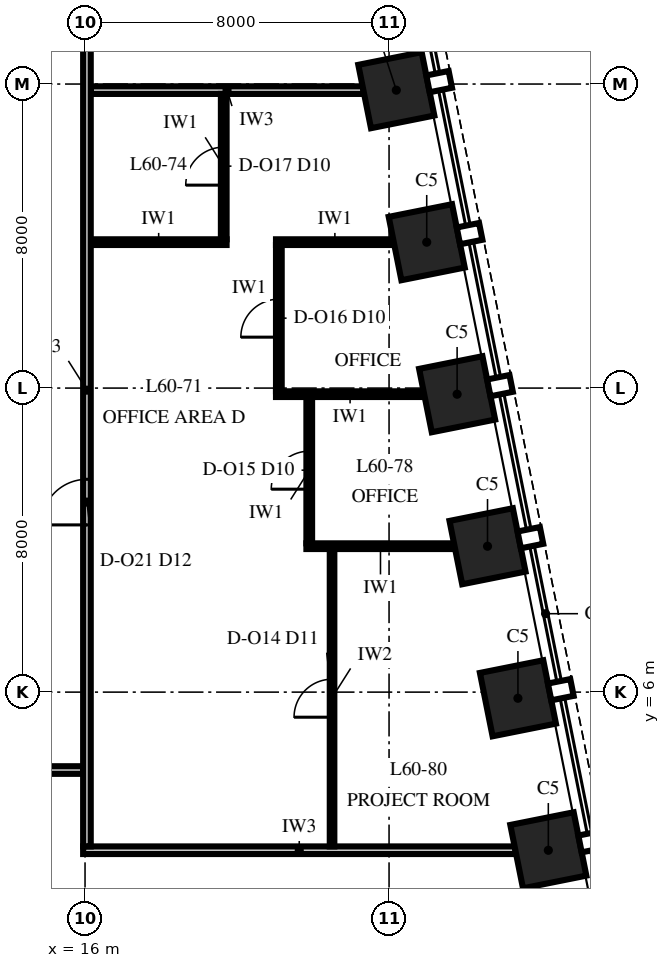
"""IFC4 building model, lengths in metres.
Left out: names, types, materials, properties, quantities, classifications, styles, units other than length and angle.
Written with IfcOpenShell. Run it as: python <this file> out.ifc"""

import sys

from ifc_helpers import new_model, si_unit, direction, frame, frame_2d, origin, origin_2d, place, context, subcontext, project, spatial, rectangle, extrude, element, fill, save


model = new_model("IFC4")
c1 = context("Model", 3, precision=1e-05, world=origin(), true_north=direction((0.0, 1.0)))
c2 = subcontext(c1, "Body", "Model", "MODEL_VIEW")
j1 = project(units=[si_unit("LENGTHUNIT", "METRE"), si_unit("PLANEANGLEUNIT", "RADIAN")], contexts=[c1])
p1 = place(None, origin())
s1 = spatial("IfcSite", under=j1, at=p1, CompositionType="ELEMENT")
p2 = place(p1, origin())
s2 = spatial("IfcBuilding", under=s1, at=p2, CompositionType="ELEMENT")
p3 = place(p2, frame((0.0, 0.0, 260.0)))
s3 = spatial("IfcBuildingStorey", under=s2, at=p3, CompositionType="ELEMENT", Elevation=260.0)
for number, where, z_axis, x_axis in (
    (1, (28.191, 1.838, 0.0), (0.0, 0.0, 1.0), (-0.196, 0.981, 0.0)),
    (2, (27.391, 5.838, 0.0), (0.0, 0.0, 1.0), (-0.196, 0.981, 0.0)),
    (3, (26.591, 9.838, 0.0), (0.0, 0.0, 1.0), (-0.196, 0.981, 0.0)),
    (4, (25.791, 13.838, 0.0), (0.0, 0.0, 1.0), (-0.196, 0.981, 0.0)),
    (5, (24.991, 17.838, 0.0), (0.0, 0.0, 1.0), (-0.196, 0.981, 0.0)),
    (6, (24.191, 21.838, 0.0), (0.0, 0.0, 1.0), (-0.196, 0.981, 0.0)),
):
    element("IfcColumn", number, at=place(p3, frame(where, z_axis=z_axis, x_axis=x_axis)), inside=s3, PredefinedType="COLUMN", context=c2, shape_type="SweptSolid", body=[
        extrude(rectangle(XDim=1.7, YDim=1.7, at=origin_2d()), origin(), (0.0, 0.0, 1.0), 4.0),
    ])
p4 = place(p3, frame((15.95, 1.84, 0.0), z_axis=(0.0, 0.0, 1.0), x_axis=(1.0, 0.0, 0.0)))
e7 = element("IfcWall", 7, at=p4, inside=s3, PredefinedType="PARTITIONING", context=c2, shape_type="SweptSolid", body=[
    extrude(rectangle(XDim=11.374, YDim=0.2, at=frame_2d((5.687, 0.0))), origin(), (0.0, 0.0, 1.0), 3.23),
])
p5 = place(p3, frame((1.9, 3.95, 0.0), z_axis=(0.0, 0.0, 1.0), x_axis=(1.0, 0.0, 0.0)))
e8 = element("IfcWall", 8, at=p5, inside=s3, PredefinedType="PARTITIONING", context=c2, shape_type="SweptSolid", body=[
    extrude(rectangle(XDim=14.05, YDim=0.2, at=frame_2d((7.025, 0.0))), origin(), (0.0, 0.0, 1.0), 3.23),
])
p6 = place(p5, frame((5.5, 0.0, 0.0)))
e9 = element("IfcOpeningElement", 9, at=p6, cuts=e8, PredefinedType="OPENING", context=c2, shape_type="SweptSolid", body=[
    extrude(rectangle(XDim=1.2, YDim=2.4, at=frame_2d((0.6, 1.2))), frame((0.0, 0.115, 0.0), z_axis=(0.0, -1.0, 0.0), x_axis=(1.0, 0.0, 0.0)), (0.0, 0.0, 1.0), 0.23),
])
for number, where, z_axis, x_axis in (
    (10, (21.825, 9.84, 0.0), (0.0, 0.0, 1.0), (1.0, 0.0, 0.0)),
    (11, (21.025, 13.84, 0.0), (0.0, 0.0, 1.0), (1.0, 0.0, 0.0)),
):
    element("IfcWall", number, at=place(p3, frame(where, z_axis=z_axis, x_axis=x_axis)), inside=s3, PredefinedType="PARTITIONING", context=c2, shape_type="SweptSolid", body=[
        extrude(rectangle(XDim=3.899, YDim=0.15, at=frame_2d((1.949, 0.0))), origin(), (0.0, 0.0, 1.0), 3.23),
    ])
p7 = place(p3, frame((16.15, 17.84, 0.0), z_axis=(0.0, 0.0, 1.0), x_axis=(1.0, 0.0, 0.0)))
e12 = element("IfcWall", 12, at=p7, inside=s3, PredefinedType="PARTITIONING", context=c2, shape_type="SweptSolid", body=[
    extrude(rectangle(XDim=3.575, YDim=0.15, at=frame_2d((1.788, 0.0))), origin(), (0.0, 0.0, 1.0), 3.23),
])
p8 = place(p3, frame((21.025, 17.84, 0.0), z_axis=(0.0, 0.0, 1.0), x_axis=(1.0, 0.0, 0.0)))
e13 = element("IfcWall", 13, at=p8, inside=s3, PredefinedType="PARTITIONING", context=c2, shape_type="SweptSolid", body=[
    extrude(rectangle(XDim=3.099, YDim=0.15, at=frame_2d((1.549, 0.0))), origin(), (0.0, 0.0, 1.0), 3.23),
])
p9 = place(p3, frame((16.15, 21.84, 0.0), z_axis=(0.0, 0.0, 1.0), x_axis=(1.0, 0.0, 0.0)))
e14 = element("IfcWall", 14, at=p9, inside=s3, PredefinedType="PARTITIONING", context=c2, shape_type="SweptSolid", body=[
    extrude(rectangle(XDim=7.174, YDim=0.2, at=frame_2d((3.587, 0.0))), origin(), (0.0, 0.0, 1.0), 3.23),
])
p10 = place(p3, frame((16.05, 1.94, 0.0), z_axis=(0.0, 0.0, 1.0), x_axis=(0.0, 1.0, 0.0)))
e15 = element("IfcWall", 15, at=p10, inside=s3, PredefinedType="PARTITIONING", context=c2, shape_type="SweptSolid", body=[
    extrude(rectangle(XDim=24.01, YDim=0.2, at=frame_2d((12.005, 0.0))), origin(), (0.0, 0.0, 1.0), 2.842),
])
p11 = place(p10, frame((8.46, 0.0, 0.0)))
e16 = element("IfcOpeningElement", 16, at=p11, cuts=e15, PredefinedType="OPENING", context=c2, shape_type="SweptSolid", body=[
    extrude(rectangle(XDim=1.2, YDim=2.4, at=frame_2d((0.6, 1.2))), frame((0.0, 0.115, 0.0), z_axis=(0.0, -1.0, 0.0), x_axis=(1.0, 0.0, 0.0)), (0.0, 0.0, 1.0), 0.23),
])
p12 = place(p10, frame((22.46, 0.0, 0.0)))
e17 = element("IfcOpeningElement", 17, at=p12, cuts=e15, PredefinedType="OPENING", context=c2, shape_type="SweptSolid", body=[
    extrude(rectangle(XDim=1.2, YDim=2.4, at=frame_2d((0.6, 1.2))), frame((0.0, 0.115, 0.0), z_axis=(0.0, -1.0, 0.0), x_axis=(1.0, 0.0, 0.0)), (0.0, 0.0, 1.0), 0.23),
])
p13 = place(p3, frame((19.65, 17.915, 0.0), z_axis=(0.0, 0.0, 1.0), x_axis=(0.0, 1.0, 0.0)))
e18 = element("IfcWall", 18, at=p13, inside=s3, PredefinedType="PARTITIONING", context=c2, shape_type="SweptSolid", body=[
    extrude(rectangle(XDim=3.825, YDim=0.15, at=frame_2d((1.913, 0.0))), origin(), (0.0, 0.0, 1.0), 3.23),
])
p14 = place(p13, frame((1.425, 0.0, 0.0)))
e19 = element("IfcOpeningElement", 19, at=p14, cuts=e18, PredefinedType="OPENING", context=c2, shape_type="SweptSolid", body=[
    extrude(rectangle(XDim=1.0, YDim=2.3, at=frame_2d((0.5, 1.15))), frame((0.0, 0.09, 0.0), z_axis=(0.0, -1.0, 0.0), x_axis=(1.0, 0.0, 0.0)), (0.0, 0.0, 1.0), 0.18),
])
p15 = place(p3, frame((21.1, 13.915, 0.0), z_axis=(0.0, 0.0, 1.0), x_axis=(0.0, 1.0, 0.0)))
e20 = element("IfcWall", 20, at=p15, inside=s3, PredefinedType="PARTITIONING", context=c2, shape_type="SweptSolid", body=[
    extrude(rectangle(XDim=3.85, YDim=0.15, at=frame_2d((1.925, 0.0))), origin(), (0.0, 0.0, 1.0), 3.23),
])
p16 = place(p15, frame((1.425, 0.0, 0.0)))
e21 = element("IfcOpeningElement", 21, at=p16, cuts=e20, PredefinedType="OPENING", context=c2, shape_type="SweptSolid", body=[
    extrude(rectangle(XDim=1.0, YDim=2.3, at=frame_2d((0.5, 1.15))), frame((0.0, 0.09, 0.0), z_axis=(0.0, -1.0, 0.0), x_axis=(1.0, 0.0, 0.0)), (0.0, 0.0, 1.0), 0.18),
])
p17 = place(p3, frame((21.9, 9.915, 0.0), z_axis=(0.0, 0.0, 1.0), x_axis=(0.0, 1.0, 0.0)))
e22 = element("IfcWall", 22, at=p17, inside=s3, PredefinedType="PARTITIONING", context=c2, shape_type="SweptSolid", body=[
    extrude(rectangle(XDim=3.85, YDim=0.15, at=frame_2d((1.925, 0.0))), origin(), (0.0, 0.0, 1.0), 3.85),
])
p18 = place(p17, frame((1.425, 0.0, 0.0)))
e23 = element("IfcOpeningElement", 23, at=p18, cuts=e22, PredefinedType="OPENING", context=c2, shape_type="SweptSolid", body=[
    extrude(rectangle(XDim=1.0, YDim=2.3, at=frame_2d((0.5, 1.15))), frame((0.0, 0.09, 0.0), z_axis=(0.0, -1.0, 0.0), x_axis=(1.0, 0.0, 0.0)), (0.0, 0.0, 1.0), 0.18),
])
p19 = place(p3, frame((22.5, 1.94, 0.0), z_axis=(0.0, 0.0, 1.0), x_axis=(0.0, 1.0, 0.0)))
e24 = element("IfcWall", 24, at=p19, inside=s3, PredefinedType="PARTITIONING", context=c2, shape_type="SweptSolid", body=[
    extrude(rectangle(XDim=7.825, YDim=0.12, at=frame_2d((3.913, 0.0))), origin(), (0.0, 0.0, 1.0), 2.842),
])
p20 = place(p19, frame((3.4, 0.0, 0.0)))
e25 = element("IfcOpeningElement", 25, at=p20, cuts=e24, PredefinedType="OPENING", context=c2, shape_type="SweptSolid", body=[
    extrude(rectangle(XDim=1.0, YDim=2.4, at=frame_2d((0.5, 1.2))), frame((0.0, 0.075, 0.0), z_axis=(0.0, -1.0, 0.0), x_axis=(1.0, 0.0, 0.0)), (0.0, 0.0, 1.0), 0.15),
])
p21 = place(p20, origin())
e26 = element("IfcDoor", 26, at=p21, inside=s3, OperationType="SINGLE_SWING_RIGHT", PredefinedType="DOOR", context=c2, shape_type="SweptSolid", body=[
    extrude(rectangle(XDim=1.0, YDim=2.4, at=frame_2d((0.5, 1.2))), frame((0.0, 0.06, 0.0), z_axis=(0.0, -1.0, 0.0), x_axis=(1.0, 0.0, 0.0)), (0.0, 0.0, 1.0), 0.12),
])
fill(e25, e26)
p22 = place(p18, origin())
e27 = element("IfcDoor", 27, at=p22, inside=s3, OperationType="SINGLE_SWING_LEFT", PredefinedType="DOOR", context=c2, shape_type="SweptSolid", body=[
    extrude(rectangle(XDim=1.0, YDim=2.3, at=frame_2d((0.5, 1.15))), frame((0.0, 0.075, 0.0), z_axis=(0.0, -1.0, 0.0), x_axis=(1.0, 0.0, 0.0)), (0.0, 0.0, 1.0), 0.149),
])
fill(e23, e27)
p23 = place(p16, origin())
e28 = element("IfcDoor", 28, at=p23, inside=s3, OperationType="SINGLE_SWING_LEFT", PredefinedType="DOOR", context=c2, shape_type="SweptSolid", body=[
    extrude(rectangle(XDim=1.0, YDim=2.3, at=frame_2d((0.5, 1.15))), frame((0.0, 0.075, 0.0), z_axis=(0.0, -1.0, 0.0), x_axis=(1.0, 0.0, 0.0)), (0.0, 0.0, 1.0), 0.149),
])
fill(e21, e28)
p24 = place(p14, origin())
e29 = element("IfcDoor", 29, at=p24, inside=s3, OperationType="SINGLE_SWING_LEFT", PredefinedType="DOOR", context=c2, shape_type="SweptSolid", body=[
    extrude(rectangle(XDim=1.0, YDim=2.3, at=frame_2d((0.5, 1.15))), frame((0.0, 0.075, 0.0), z_axis=(0.0, -1.0, 0.0), x_axis=(1.0, 0.0, 0.0)), (0.0, 0.0, 1.0), 0.149),
])
fill(e19, e29)
p25 = place(p11, origin())
e30 = element("IfcDoor", 30, at=p25, inside=s3, OperationType="SINGLE_SWING_LEFT", PredefinedType="DOOR", context=c2, shape_type="SweptSolid", body=[
    extrude(rectangle(XDim=1.2, YDim=2.4, at=frame_2d((0.6, 1.2))), frame((0.0, 0.1, 0.0), z_axis=(0.0, -1.0, 0.0), x_axis=(1.0, 0.0, 0.0)), (0.0, 0.0, 1.0), 0.199),
])
fill(e16, e30)
save(model, sys.argv[1])
